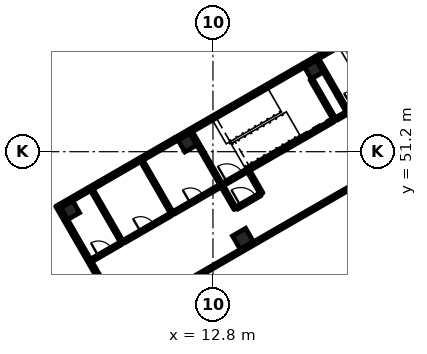
"""IFC4 building model, lengths in metres.
Left out: names, types, materials, properties, quantities, classifications, styles, units other than length and angle.
Written with IfcOpenShell. Run it as: python <this file> out.ifc"""

import sys

from ifc_helpers import new_model, si_unit, direction, frame, frame_2d, origin, origin_2d, place, context, subcontext, project, spatial, rectangle, extrude, element, fill, save


model = new_model("IFC4")
c1 = context("Model", 3, precision=1e-05, world=origin(), true_north=direction((0.0, 1.0)))
c2 = subcontext(c1, "Body", "Model", "MODEL_VIEW")
j1 = project(units=[si_unit("LENGTHUNIT", "METRE"), si_unit("PLANEANGLEUNIT", "RADIAN")], contexts=[c1])
p1 = place(None, origin())
s1 = spatial("IfcSite", under=j1, at=p1, CompositionType="ELEMENT")
p2 = place(p1, origin())
s2 = spatial("IfcBuilding", under=s1, at=p2, CompositionType="ELEMENT")
p3 = place(p2, frame((0.0, 0.0, 11.4)))
s3 = spatial("IfcBuildingStorey", under=s2, at=p3, CompositionType="ELEMENT", Elevation=11.4)
p4 = place(p3, frame((14.768, 45.477, 0.0), z_axis=(0.0, 0.0, 1.0), x_axis=(-0.5, 0.866025403784, 0.0)))
e1 = element("IfcColumn", 1, at=p4, inside=s3, PredefinedType="COLUMN", context=c2, shape_type="SweptSolid", body=[
    extrude(rectangle(XDim=1.0, YDim=1.0, at=origin_2d()), origin(), (0.0, 0.0, 1.0), 4.8),
])
for number, where, z_axis, x_axis in (
    (2, (3.41, 47.349, 0.0), (0.0, 0.0, 1.0), (-0.5, 0.866, 0.0)),
    (3, (11.118, 51.799, 0.0), (0.0, 0.0, 1.0), (-0.5, 0.866, 0.0)),
    (4, (19.432, 56.599, 0.0), (0.0, 0.0, 1.0), (-0.5, 0.866, 0.0)),
):
    element("IfcColumn", number, at=place(p3, frame(where, z_axis=z_axis, x_axis=x_axis)), inside=s3, PredefinedType="COLUMN", context=c2, shape_type="SweptSolid", body=[
        extrude(rectangle(XDim=0.9, YDim=0.9, at=origin_2d()), origin(), (0.0, 0.0, 1.0), 4.8),
    ])
p5 = place(p3, frame((7.719, 38.737, 0.0), z_axis=(0.0, 0.0, 1.0), x_axis=(-0.500001855621, 0.866024332438, 0.0)))
e5 = element("IfcWall", 5, at=p5, inside=s3, PredefinedType="SOLIDWALL", context=c2, shape_type="SweptSolid", body=[
    extrude(rectangle(XDim=10.312, YDim=0.25, at=frame_2d((5.156, 0.0))), origin(), (0.0, 0.0, 1.0), 4.5),
])
p6 = place(p3, frame((2.733, 47.622, 0.0), z_axis=(0.0, 0.0, 1.0), x_axis=(0.866010750942, 0.50002537861, 0.0)))
e6 = element("IfcWall", 6, at=p6, inside=s3, PredefinedType="SOLIDWALL", context=c2, shape_type="SweptSolid", body=[
    extrude(rectangle(XDim=3.0, YDim=0.25, at=frame_2d((1.5, 0.0))), origin(), (0.0, 0.0, 1.0), 4.5),
])
p7 = place(p3, frame((5.331, 49.122, 0.0), z_axis=(0.0, 0.0, 1.0), x_axis=(0.866036343161, 0.499981051965, 0.0)))
e7 = element("IfcWall", 7, at=p7, inside=s3, PredefinedType="SOLIDWALL", context=c2, shape_type="SweptSolid", body=[
    extrude(rectangle(XDim=5.775, YDim=0.25, at=frame_2d((2.888, 0.0))), origin(), (0.0, 0.0, 1.0), 4.5),
])
p8 = place(p7, frame((0.25, 0.0, 0.9)))
e8 = element("IfcOpeningElement", 8, at=p8, cuts=e7, PredefinedType="OPENING", context=c2, shape_type="SweptSolid", body=[
    extrude(rectangle(XDim=2.0, YDim=1.8, at=frame_2d((1.0, 0.9))), frame((0.0, 0.135, 0.0), z_axis=(0.0, -1.0, 0.0), x_axis=(1.0, 0.0, 0.0)), (0.0, 0.0, 1.0), 0.27),
])
p9 = place(p7, frame((3.525, 0.0, 0.9)))
e9 = element("IfcOpeningElement", 9, at=p9, cuts=e7, PredefinedType="OPENING", context=c2, shape_type="SweptSolid", body=[
    extrude(rectangle(XDim=2.0, YDim=1.8, at=frame_2d((1.0, 0.9))), frame((0.0, 0.135, 0.0), z_axis=(0.0, -1.0, 0.0), x_axis=(1.0, 0.0, 0.0)), (0.0, 0.0, 1.0), 0.27),
])
p10 = place(p3, frame((10.333, 52.009, 0.0), z_axis=(0.0, 0.0, 1.0), x_axis=(0.866023797515, 0.500002782129, 0.0)))
e10 = element("IfcWall", 10, at=p10, inside=s3, PredefinedType="SOLIDWALL", context=c2, shape_type="SweptSolid", body=[
    extrude(rectangle(XDim=9.725, YDim=0.25, at=frame_2d((4.863, 0.0))), origin(), (0.0, 0.0, 1.0), 4.5),
])
p11 = place(p3, frame((19.621, 57.372, 0.0), z_axis=(0.0, 0.0, 1.0), x_axis=(0.866021068297, 0.500007509209, 0.0)))
e11 = element("IfcWall", 11, at=p11, inside=s3, PredefinedType="SOLIDWALL", context=c2, shape_type="SweptSolid", body=[
    extrude(rectangle(XDim=8.6, YDim=0.25, at=frame_2d((4.3, 0.0))), origin(), (0.0, 0.0, 1.0), 4.5),
])
p12 = place(p3, frame((18.755, 56.872, 0.0), z_axis=(0.0, 0.0, 1.0), x_axis=(0.866010750942, 0.50002537861, 0.0)))
e12 = element("IfcWall", 12, at=p12, inside=s3, PredefinedType="SOLIDWALL", context=c2, shape_type="SweptSolid", body=[
    extrude(rectangle(XDim=1.0, YDim=0.25, at=frame_2d((0.5, 0.0))), origin(), (0.0, 0.0, 1.0), 4.5),
])
p13 = place(p3, frame((13.369, 49.0, 0.0), z_axis=(0.0, 0.0, 1.0), x_axis=(-0.50002537861, 0.866010750942, 0.0)))
e13 = element("IfcWall", 13, at=p13, inside=s3, PredefinedType="SOLIDWALL", context=c2, shape_type="SweptSolid", body=[
    extrude(rectangle(XDim=4.0, YDim=0.2, at=frame_2d((2.0, 0.0))), origin(), (0.0, 0.0, 1.0), 4.5),
])
p14 = place(p3, frame((20.817, 53.299, 0.0), z_axis=(0.0, 0.0, 1.0), x_axis=(-0.49999285859, 0.86602952684, 0.0)))
e14 = element("IfcWall", 14, at=p14, inside=s3, PredefinedType="SOLIDWALL", context=c2, shape_type="SweptSolid", body=[
    extrude(rectangle(XDim=3.1, YDim=0.2, at=frame_2d((1.55, 0.0))), origin(), (0.0, 0.0, 1.0), 4.5),
])
p15 = place(p3, frame((21.683, 53.799, 0.0), z_axis=(0.0, 0.0, 1.0), x_axis=(-0.49999894854, 0.866026010844, 0.0)))
e15 = element("IfcWall", 15, at=p15, inside=s3, PredefinedType="SOLIDWALL", context=c2, shape_type="SweptSolid", body=[
    extrude(rectangle(XDim=4.0, YDim=0.2, at=frame_2d((2.0, 0.0))), origin(), (0.0, 0.0, 1.0), 4.5),
])
p16 = place(p3, frame((13.456, 49.049, 0.0), z_axis=(0.0, 0.0, 1.0), x_axis=(0.866036909293, 0.499980071345, 0.0)))
e16 = element("IfcWall", 16, at=p16, inside=s3, PredefinedType="SOLIDWALL", context=c2, shape_type="SweptSolid", body=[
    extrude(rectangle(XDim=1.75, YDim=0.2, at=frame_2d((0.875, 0.0))), origin(), (0.0, 0.0, 1.0), 4.5),
])
p17 = place(p16, frame((0.3, 0.0, 0.0)))
e17 = element("IfcOpeningElement", 17, at=p17, cuts=e16, PredefinedType="OPENING", context=c2, shape_type="SweptSolid", body=[
    extrude(rectangle(XDim=1.2, YDim=2.1, at=frame_2d((0.6, 1.05))), frame((0.0, 0.11, 0.0), z_axis=(0.0, -1.0, 0.0), x_axis=(1.0, 0.0, 0.0)), (0.0, 0.0, 1.0), 0.22),
])
p18 = place(p3, frame((14.972, 49.924, 0.0), z_axis=(0.0, 0.0, 1.0), x_axis=(0.86601134256, 0.500024353964, 0.0)))
e18 = element("IfcWall", 18, at=p18, inside=s3, PredefinedType="SOLIDWALL", context=c2, shape_type="SweptSolid", body=[
    extrude(rectangle(XDim=6.65, YDim=0.2, at=frame_2d((3.325, 0.0))), origin(), (0.0, 0.0, 1.0), 4.5),
])
for number, where, z_axis, x_axis in (
    (19, (14.27, 47.441, 0.0), (0.0, 0.0, 1.0), (-0.5, 0.866, 0.0)),
    (20, (16.001, 48.441, 0.0), (0.0, 0.0, 1.0), (-0.5, 0.866, 0.0)),
    (21, (22.583, 52.24, 0.0), (0.0, 0.0, 1.0), (-0.5, 0.866, 0.0)),
):
    element("IfcWall", number, at=place(p3, frame(where, z_axis=z_axis, x_axis=x_axis)), inside=s3, PredefinedType="PARTITIONING", context=c2, shape_type="SweptSolid", body=[
        extrude(rectangle(XDim=1.7, YDim=0.2, at=frame_2d((0.85, 0.0))), origin(), (0.0, 0.0, 1.0), 3.9),
    ])
p19 = place(p3, frame((14.356, 47.49, 0.0), z_axis=(0.0, 0.0, 1.0), x_axis=(0.865955154139, 0.50012165622, 0.0)))
e22 = element("IfcWall", 22, at=p19, inside=s3, PredefinedType="PARTITIONING", context=c2, shape_type="SweptSolid", body=[
    extrude(rectangle(XDim=1.8, YDim=0.2, at=frame_2d((0.9, 0.0))), origin(), (0.0, 0.0, 1.0), 3.9),
])
p20 = place(p19, frame((0.3, 0.0, 0.0)))
e23 = element("IfcOpeningElement", 23, at=p20, cuts=e22, PredefinedType="OPENING", context=c2, shape_type="SweptSolid", body=[
    extrude(rectangle(XDim=1.2, YDim=2.1, at=frame_2d((0.6, 1.05))), frame((0.0, 0.11, 0.0), z_axis=(0.0, -1.0, 0.0), x_axis=(1.0, 0.0, 0.0)), (0.0, 0.0, 1.0), 0.22),
])
p21 = place(p3, frame((6.831, 45.224, 0.0), z_axis=(0.0, 0.0, 1.0), x_axis=(-0.49999894854, 0.866026010844, 0.0)))
e24 = element("IfcWall", 24, at=p21, inside=s3, PredefinedType="PARTITIONING", context=c2, shape_type="SweptSolid", body=[
    extrude(rectangle(XDim=4.0, YDim=0.2, at=frame_2d((2.0, 0.0))), origin(), (0.0, 0.0, 1.0), 3.9),
])
p22 = place(p3, frame((4.796, 44.049, 0.0), z_axis=(0.0, 0.0, 1.0), x_axis=(0.866017533419, 0.500013631625, 0.0)))
e25 = element("IfcWall", 25, at=p22, inside=s3, PredefinedType="PARTITIONING", context=c2, shape_type="SweptSolid", body=[
    extrude(rectangle(XDim=2.25, YDim=0.2, at=frame_2d((1.125, 0.0))), origin(), (0.0, 0.0, 1.0), 3.9),
])
p23 = place(p22, frame((0.55, 0.0, 0.0)))
e26 = element("IfcOpeningElement", 26, at=p23, cuts=e25, PredefinedType="OPENING", context=c2, shape_type="SweptSolid", body=[
    extrude(rectangle(XDim=1.0, YDim=2.1, at=frame_2d((0.5, 1.05))), frame((0.0, 0.11, 0.0), z_axis=(0.0, -1.0, 0.0), x_axis=(1.0, 0.0, 0.0)), (0.0, 0.0, 1.0), 0.22),
])
p24 = place(p3, frame((10.122, 47.125, 0.0), z_axis=(0.0, 0.0, 1.0), x_axis=(-0.50002537861, 0.866010750942, 0.0)))
e27 = element("IfcWall", 27, at=p24, inside=s3, PredefinedType="PARTITIONING", context=c2, shape_type="SweptSolid", body=[
    extrude(rectangle(XDim=4.0, YDim=0.2, at=frame_2d((2.0, 0.0))), origin(), (0.0, 0.0, 1.0), 3.9),
])
p25 = place(p3, frame((6.917, 45.274, 0.0), z_axis=(0.0, 0.0, 1.0), x_axis=(0.866035395735, 0.499982693035, 0.0)))
e28 = element("IfcWall", 28, at=p25, inside=s3, PredefinedType="PARTITIONING", context=c2, shape_type="SweptSolid", body=[
    extrude(rectangle(XDim=3.6, YDim=0.2, at=frame_2d((1.8, 0.0))), origin(), (0.0, 0.0, 1.0), 3.9),
])
p26 = place(p25, frame((1.3, 0.0, 0.0)))
e29 = element("IfcOpeningElement", 29, at=p26, cuts=e28, PredefinedType="OPENING", context=c2, shape_type="SweptSolid", body=[
    extrude(rectangle(XDim=1.0, YDim=2.1, at=frame_2d((0.5, 1.05))), frame((0.0, 0.11, 0.0), z_axis=(0.0, -1.0, 0.0), x_axis=(1.0, 0.0, 0.0)), (0.0, 0.0, 1.0), 0.22),
])
p27 = place(p3, frame((10.208, 47.174, 0.0), z_axis=(0.0, 0.0, 1.0), x_axis=(0.866012656725, 0.500022077904, 0.0)))
e30 = element("IfcWall", 30, at=p27, inside=s3, PredefinedType="PARTITIONING", context=c2, shape_type="SweptSolid", body=[
    extrude(rectangle(XDim=3.55, YDim=0.2, at=frame_2d((1.775, 0.0))), origin(), (0.0, 0.0, 1.0), 3.9),
])
p28 = place(p27, frame((1.275, 0.0, 0.0)))
e31 = element("IfcOpeningElement", 31, at=p28, cuts=e30, PredefinedType="OPENING", context=c2, shape_type="SweptSolid", body=[
    extrude(rectangle(XDim=1.0, YDim=2.1, at=frame_2d((0.5, 1.05))), frame((0.0, 0.11, 0.0), z_axis=(0.0, -1.0, 0.0), x_axis=(1.0, 0.0, 0.0)), (0.0, 0.0, 1.0), 0.22),
])
p29 = place(p3, frame((10.491, 42.286, 0.0), z_axis=(0.0, 0.0, 1.0), x_axis=(0.866025540551, 0.499999763114, 0.0)))
e32 = element("IfcWall", 32, at=p29, inside=s3, PredefinedType="PARTITIONING", context=c2, shape_type="SweptSolid", body=[
    extrude(rectangle(XDim=39.4, YDim=0.2, at=frame_2d((19.7, 0.0))), origin(), (0.0, 0.0, 1.0), 3.9),
])
p30 = place(p3, frame((20.904, 53.349, 0.0), z_axis=(0.0, 0.0, 1.0), x_axis=(0.865961984968, 0.500109828528, 0.0)))
e33 = element("IfcWall", 33, at=p30, inside=s3, PredefinedType="PARTITIONING", context=c2, shape_type="SweptSolid", body=[
    extrude(rectangle(XDim=0.8, YDim=0.2, at=frame_2d((0.4, 0.0))), origin(), (0.0, 0.0, 1.0), 3.9),
])
p31 = place(p8, origin())
e34 = element("IfcWindow", 34, at=p31, inside=s3, PartitioningType="SINGLE_PANEL", PredefinedType="WINDOW", context=c2, shape_type="SweptSolid", body=[
    extrude(rectangle(XDim=2.0, YDim=1.8, at=frame_2d((1.0, 0.9))), frame((0.0, 0.03, 0.0), z_axis=(0.0, -1.0, 0.0), x_axis=(1.0, 0.0, 0.0)), (0.0, 0.0, 1.0), 0.06),
])
fill(e8, e34)
p32 = place(p9, origin())
e35 = element("IfcWindow", 35, at=p32, inside=s3, PartitioningType="SINGLE_PANEL", PredefinedType="WINDOW", context=c2, shape_type="SweptSolid", body=[
    extrude(rectangle(XDim=2.0, YDim=1.8, at=frame_2d((1.0, 0.9))), frame((0.0, 0.03, 0.0), z_axis=(0.0, -1.0, 0.0), x_axis=(1.0, 0.0, 0.0)), (0.0, 0.0, 1.0), 0.06),
])
fill(e9, e35)
p33 = place(p17, origin())
e36 = element("IfcDoor", 36, at=p33, inside=s3, OperationType="SINGLE_SWING_LEFT", PredefinedType="DOOR", context=c2, shape_type="SweptSolid", body=[
    extrude(rectangle(XDim=1.2, YDim=2.1, at=frame_2d((0.6, 1.05))), frame((0.0, 0.025, 0.0), z_axis=(0.0, -1.0, 0.0), x_axis=(1.0, 0.0, 0.0)), (0.0, 0.0, 1.0), 0.05),
])
fill(e17, e36)
p34 = place(p20, origin())
e37 = element("IfcDoor", 37, at=p34, inside=s3, OperationType="SINGLE_SWING_LEFT", PredefinedType="DOOR", context=c2, shape_type="SweptSolid", body=[
    extrude(rectangle(XDim=1.2, YDim=2.1, at=frame_2d((0.6, 1.05))), frame((0.0, 0.025, 0.0), z_axis=(0.0, -1.0, 0.0), x_axis=(1.0, 0.0, 0.0)), (0.0, 0.0, 1.0), 0.05),
])
fill(e23, e37)
p35 = place(p23, origin())
e38 = element("IfcDoor", 38, at=p35, inside=s3, OperationType="SINGLE_SWING_LEFT", PredefinedType="DOOR", context=c2, shape_type="SweptSolid", body=[
    extrude(rectangle(XDim=1.0, YDim=2.1, at=frame_2d((0.5, 1.05))), frame((0.0, 0.025, 0.0), z_axis=(0.0, -1.0, 0.0), x_axis=(1.0, 0.0, 0.0)), (0.0, 0.0, 1.0), 0.05),
])
fill(e26, e38)
p36 = place(p26, origin())
e39 = element("IfcDoor", 39, at=p36, inside=s3, OperationType="SINGLE_SWING_LEFT", PredefinedType="DOOR", context=c2, shape_type="SweptSolid", body=[
    extrude(rectangle(XDim=1.0, YDim=2.1, at=frame_2d((0.5, 1.05))), frame((0.0, 0.025, 0.0), z_axis=(0.0, -1.0, 0.0), x_axis=(1.0, 0.0, 0.0)), (0.0, 0.0, 1.0), 0.05),
])
fill(e29, e39)
p37 = place(p28, origin())
e40 = element("IfcDoor", 40, at=p37, inside=s3, OperationType="SINGLE_SWING_LEFT", PredefinedType="DOOR", context=c2, shape_type="SweptSolid", body=[
    extrude(rectangle(XDim=1.0, YDim=2.1, at=frame_2d((0.5, 1.05))), frame((0.0, 0.025, 0.0), z_axis=(0.0, -1.0, 0.0), x_axis=(1.0, 0.0, 0.0)), (0.0, 0.0, 1.0), 0.05),
])
fill(e31, e40)
save(model, sys.argv[1])
